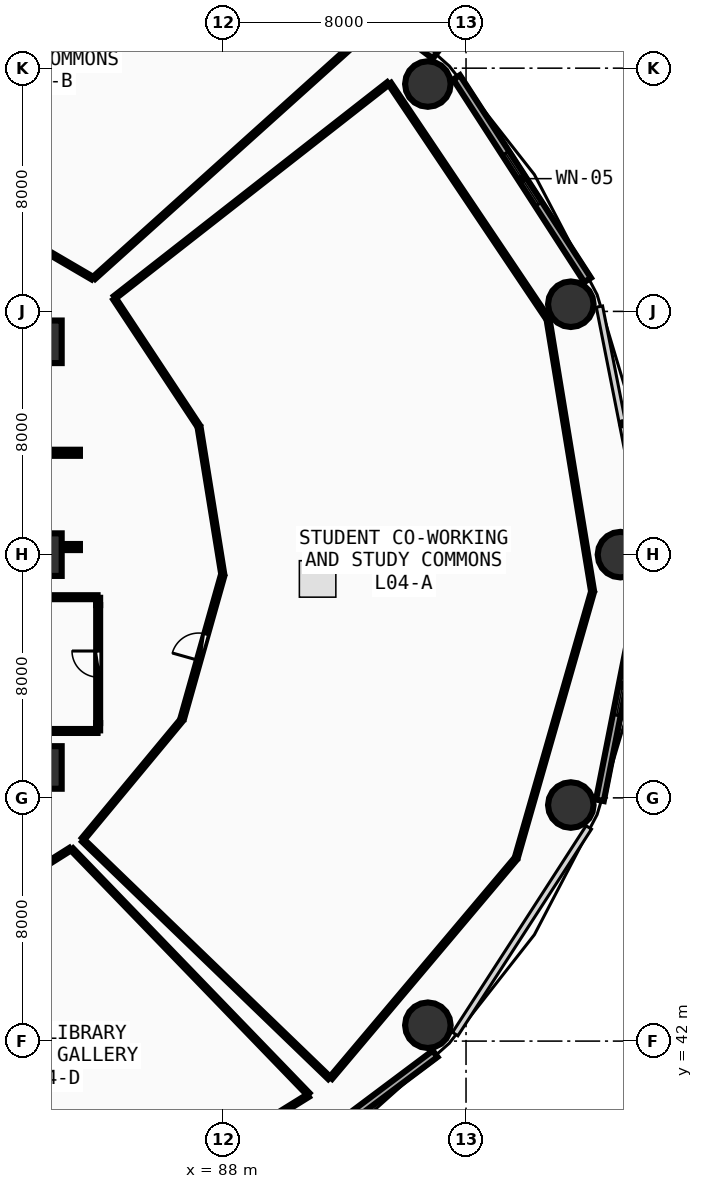
"""IFC4 building model, lengths in metres.
Left out: names, types, materials, properties, quantities, classifications, styles, units other than length and angle.
Written with IfcOpenShell. Run it as: python <this file> out.ifc"""

import sys

from ifc_helpers import new_model, si_unit, direction, frame, frame_2d, origin, origin_2d, place, context, subcontext, project, spatial, rectangle, circle, extrude, element, fill, save


model = new_model("IFC4")
c1 = context("Model", 3, precision=1e-05, world=origin(), true_north=direction((0.0, 1.0)))
c2 = subcontext(c1, "Body", "Model", "MODEL_VIEW")
j1 = project(units=[si_unit("LENGTHUNIT", "METRE"), si_unit("PLANEANGLEUNIT", "RADIAN")], contexts=[c1])
p1 = place(None, origin())
s1 = spatial("IfcSite", under=j1, at=p1, CompositionType="ELEMENT")
p2 = place(p1, origin())
s2 = spatial("IfcBuilding", under=s1, at=p2, CompositionType="ELEMENT")
p3 = place(p2, frame((0.0, 0.0, 18.0)))
s3 = spatial("IfcBuildingStorey", under=s2, at=p3, CompositionType="ELEMENT", Elevation=18.0)
for number, where, z_axis, x_axis in (
    (1, (82.0, 51.0, 0.0), (0.0, 0.0, 1.0), (1.0, 0.0, 0.0)),
    (2, (82.0, 58.0, 0.0), (0.0, 0.0, 1.0), (1.0, 0.0, 0.0)),
    (3, (82.0, 65.0, 0.0), (0.0, 0.0, 1.0), (1.0, 0.0, 0.0)),
):
    element("IfcColumn", number, at=place(p3, frame(where, z_axis=z_axis, x_axis=x_axis)), inside=s3, PredefinedType="PILASTER", context=c2, shape_type="SweptSolid", body=[
        extrude(rectangle(XDim=1.4, YDim=1.4, at=origin_2d()), origin(), (0.0, 0.0, 1.0), 4.5),
    ])
for number, where, z_axis, x_axis in (
    (4, (101.08, 58.0, 0.0), (0.0, 0.0, 1.0), (1.0, 0.0, 0.0)),
    (5, (99.447, 66.236, 0.0), (0.0, 0.0, 1.0), (1.0, 0.0, 0.0)),
    (6, (94.744, 73.478, 0.0), (0.0, 0.0, 1.0), (1.0, 0.0, 0.0)),
    (7, (94.744, 42.522, 0.0), (0.0, 0.0, 1.0), (1.0, 0.0, 0.0)),
    (8, (99.447, 49.764, 0.0), (0.0, 0.0, 1.0), (1.0, 0.0, 0.0)),
):
    element("IfcColumn", number, at=place(p3, frame(where, z_axis=z_axis, x_axis=x_axis)), inside=s3, PredefinedType="COLUMN", context=c2, shape_type="SweptSolid", body=[
        extrude(circle(Radius=0.75, at=origin_2d()), origin(), (0.0, 0.0, 1.0), 4.5),
    ])
p4 = place(p3, frame((99.999, 67.033, 0.0), z_axis=(0.0, 0.0, 1.0), x_axis=(-0.543005114258, 0.839729388488, 0.0)))
e9 = element("IfcWall", 9, at=p4, inside=s3, PredefinedType="SOLIDWALL", context=c2, shape_type="SweptSolid", body=[
    extrude(rectangle(XDim=7.938, YDim=0.26, at=frame_2d((3.969, 0.0))), origin(), (0.0, 0.0, 1.0), 4.225),
])
p5 = place(p4, frame((2.969, 0.0, 0.85)))
e10 = element("IfcOpeningElement", 10, at=p5, cuts=e9, PredefinedType="OPENING", context=c2, shape_type="SweptSolid", body=[
    extrude(rectangle(XDim=2.0, YDim=1.75, at=frame_2d((1.0, 0.875))), frame((0.0, 0.14, 0.0), z_axis=(0.0, -1.0, 0.0), x_axis=(1.0, 0.0, 0.0)), (0.0, 0.0, 1.0), 0.28),
])
p6 = place(p3, frame((94.984, 74.418, 0.0), z_axis=(0.0, 0.0, 1.0), x_axis=(-0.80030733173, 0.599590005569, 0.0)))
e11 = element("IfcWall", 11, at=p6, inside=s3, PredefinedType="SOLIDWALL", context=c2, shape_type="SweptSolid", body=[
    extrude(rectangle(XDim=8.291, YDim=0.26, at=frame_2d((4.145, 0.0))), origin(), (0.0, 0.0, 1.0), 4.225),
])
p7 = place(p6, frame((3.145, 0.0, 0.85)))
e12 = element("IfcOpeningElement", 12, at=p7, cuts=e11, PredefinedType="OPENING", context=c2, shape_type="SweptSolid", body=[
    extrude(rectangle(XDim=2.0, YDim=1.75, at=frame_2d((1.0, 0.875))), frame((0.0, 0.14, 0.0), z_axis=(0.0, -1.0, 0.0), x_axis=(1.0, 0.0, 0.0)), (0.0, 0.0, 1.0), 0.28),
])
p8 = place(p3, frame((88.349, 36.611, 0.0), z_axis=(0.0, 0.0, 1.0), x_axis=(0.80030733173, 0.599590005569, 0.0)))
e13 = element("IfcWall", 13, at=p8, inside=s3, PredefinedType="SOLIDWALL", context=c2, shape_type="SweptSolid", body=[
    extrude(rectangle(XDim=8.291, YDim=0.26, at=frame_2d((4.145, 0.0))), origin(), (0.0, 0.0, 1.0), 4.225),
])
p9 = place(p8, frame((3.145, 0.0, 0.85)))
e14 = element("IfcOpeningElement", 14, at=p9, cuts=e13, PredefinedType="OPENING", context=c2, shape_type="SweptSolid", body=[
    extrude(rectangle(XDim=2.0, YDim=1.75, at=frame_2d((1.0, 0.875))), frame((0.0, 0.14, 0.0), z_axis=(0.0, -1.0, 0.0), x_axis=(1.0, 0.0, 0.0)), (0.0, 0.0, 1.0), 0.28),
])
p10 = place(p3, frame((100.404, 49.92, 0.0), z_axis=(0.0, 0.0, 1.0), x_axis=(0.193726159581, 0.98105564322, 0.0)))
e15 = element("IfcWall", 15, at=p10, inside=s3, PredefinedType="SOLIDWALL", context=c2, shape_type="SweptSolid", body=[
    extrude(rectangle(XDim=7.703, YDim=0.26, at=frame_2d((3.851, 0.0))), origin(), (0.0, 0.0, 1.0), 4.225),
])
p11 = place(p10, frame((2.851, 0.0, 0.85)))
e16 = element("IfcOpeningElement", 16, at=p11, cuts=e15, PredefinedType="OPENING", context=c2, shape_type="SweptSolid", body=[
    extrude(rectangle(XDim=2.0, YDim=1.75, at=frame_2d((1.0, 0.875))), frame((0.0, 0.14, 0.0), z_axis=(0.0, -1.0, 0.0), x_axis=(1.0, 0.0, 0.0)), (0.0, 0.0, 1.0), 0.28),
])
p12 = place(p3, frame((79.3, 61.35, 0.0), z_axis=(0.0, 0.0, 1.0), x_axis=(1.0, 0.0, 0.0)))
e17 = element("IfcWall", 17, at=p12, inside=s3, PredefinedType="SOLIDWALL", context=c2, shape_type="SweptSolid", body=[
    extrude(rectangle(XDim=4.0, YDim=0.2, at=frame_2d((2.0, 0.0))), origin(), (0.0, 0.0, 1.0), 3.525),
])
p13 = place(p12, frame((0.45, 0.0, 0.0)))
e18 = element("IfcOpeningElement", 18, at=p13, cuts=e17, PredefinedType="OPENING", context=c2, shape_type="SweptSolid", body=[
    extrude(rectangle(XDim=1.2, YDim=2.15, at=frame_2d((0.6, 1.075))), frame((0.0, 0.11, 0.0), z_axis=(0.0, -1.0, 0.0), x_axis=(1.0, 0.0, 0.0)), (0.0, 0.0, 1.0), 0.22),
])
p14 = place(p3, frame((79.3, 58.25, 0.0), z_axis=(0.0, 0.0, 1.0), x_axis=(1.0, 0.0, 0.0)))
e19 = element("IfcWall", 19, at=p14, inside=s3, PredefinedType="SOLIDWALL", context=c2, shape_type="SweptSolid", body=[
    extrude(rectangle(XDim=4.0, YDim=0.2, at=frame_2d((2.0, 0.0))), origin(), (0.0, 0.0, 1.0), 3.525),
])
p15 = place(p14, frame((0.5, 0.0, 0.0)))
e20 = element("IfcOpeningElement", 20, at=p15, cuts=e19, PredefinedType="OPENING", context=c2, shape_type="SweptSolid", body=[
    extrude(rectangle(XDim=1.1, YDim=2.1, at=frame_2d((0.55, 1.05))), frame((0.0, 0.11, 0.0), z_axis=(0.0, -1.0, 0.0), x_axis=(1.0, 0.0, 0.0)), (0.0, 0.0, 1.0), 0.22),
])
p16 = place(p3, frame((83.9, 52.46, 0.0), z_axis=(0.0, 0.0, 1.0), x_axis=(0.0, 1.0, 0.0)))
e21 = element("IfcWall", 21, at=p16, inside=s3, PredefinedType="PLUMBINGWALL", context=c2, shape_type="SweptSolid", body=[
    extrude(rectangle(XDim=3.88, YDim=0.13, at=frame_2d((1.94, 0.0))), origin(), (0.0, 0.0, 1.0), 4.23),
])
p17 = place(p16, frame((1.51, 0.0, 0.0)))
e22 = element("IfcOpeningElement", 22, at=p17, cuts=e21, PredefinedType="OPENING", context=c2, shape_type="SweptSolid", body=[
    extrude(rectangle(XDim=0.86, YDim=2.05, at=frame_2d((0.43, 1.025))), frame((0.0, 0.075, 0.0), z_axis=(0.0, -1.0, 0.0), x_axis=(1.0, 0.0, 0.0)), (0.0, 0.0, 1.0), 0.15),
])
p18 = place(p3, frame((86.67, 52.625, 0.0), z_axis=(0.0, 0.0, 1.0), x_axis=(0.27156800538, 0.962419252953, 0.0)))
e23 = element("IfcWall", 23, at=p18, inside=s3, PredefinedType="PARTITIONING", context=c2, shape_type="SweptSolid", body=[
    extrude(rectangle(XDim=4.839, YDim=0.12, at=frame_2d((2.42, 0.0))), origin(), (0.0, 0.0, 1.0), 4.23),
])
p19 = place(p18, frame((1.97, 0.0, 0.0)))
e24 = element("IfcOpeningElement", 24, at=p19, cuts=e23, PredefinedType="OPENING", context=c2, shape_type="SweptSolid", body=[
    extrude(rectangle(XDim=0.9, YDim=2.08, at=frame_2d((0.45, 1.04))), frame((0.0, 0.07, 0.0), z_axis=(0.0, -1.0, 0.0), x_axis=(1.0, 0.0, 0.0)), (0.0, 0.0, 1.0), 0.14),
])
p20 = place(p3, frame((82.14, 52.2, 0.0), z_axis=(0.0, 0.0, 1.0), x_axis=(1.0, 0.0, 0.0)))
e25 = element("IfcWall", 25, at=p20, inside=s3, PredefinedType="PLUMBINGWALL", context=c2, shape_type="SweptSolid", body=[
    extrude(rectangle(XDim=1.74, YDim=0.13, at=frame_2d((0.87, 0.0))), origin(), (0.0, 0.0, 1.0), 3.525),
])
for number, where, z_axis, x_axis in (
    (26, (83.9, 52.22, 0.0), (0.0, 0.0, 1.0), (0.0, 1.0, 0.0)),
    (27, (83.9, 56.34, 0.0), (0.0, 0.0, 1.0), (0.0, 1.0, 0.0)),
):
    element("IfcWall", number, at=place(p3, frame(where, z_axis=z_axis, x_axis=x_axis)), inside=s3, PredefinedType="PLUMBINGWALL", context=c2, shape_type="SweptSolid", body=[
        extrude(rectangle(XDim=0.24, YDim=0.13, at=frame_2d((0.12, 0.0))), origin(), (0.0, 0.0, 1.0), 4.23),
    ])
p21 = place(p3, frame((83.88, 56.6, 0.0), z_axis=(0.0, 0.0, 1.0), x_axis=(-1.0, 0.0, 0.0)))
e28 = element("IfcWall", 28, at=p21, inside=s3, PredefinedType="PLUMBINGWALL", context=c2, shape_type="SweptSolid", body=[
    extrude(rectangle(XDim=1.74, YDim=0.13, at=frame_2d((0.87, 0.0))), origin(), (0.0, 0.0, 1.0), 3.525),
])
p22 = place(p3, frame((83.406, 48.653, 0.0), z_axis=(0.0, 0.0, 1.0), x_axis=(0.638526743423, 0.769599634832, 0.0)))
e29 = element("IfcWall", 29, at=p22, inside=s3, PredefinedType="PARTITIONING", context=c2, shape_type="SweptSolid", body=[
    extrude(rectangle(XDim=5.046, YDim=0.1, at=frame_2d((2.523, 0.0))), origin(), (0.0, 0.0, 1.0), 3.625),
])
p23 = place(p3, frame((87.995, 57.379, 0.0), z_axis=(0.0, 0.0, 1.0), x_axis=(-0.159023783725, 0.987274752138, 0.0)))
e30 = element("IfcWall", 30, at=p23, inside=s3, PredefinedType="PARTITIONING", context=c2, shape_type="SweptSolid", body=[
    extrude(rectangle(XDim=4.856, YDim=0.1, at=frame_2d((2.428, 0.0))), origin(), (0.0, 0.0, 1.0), 3.625),
])
p24 = place(p3, frame((87.194, 62.246, 0.0), z_axis=(0.0, 0.0, 1.0), x_axis=(-0.551434167509, 0.834218411991, 0.0)))
e31 = element("IfcWall", 31, at=p24, inside=s3, PredefinedType="PARTITIONING", context=c2, shape_type="SweptSolid", body=[
    extrude(rectangle(XDim=4.992, YDim=0.1, at=frame_2d((2.496, 0.0))), origin(), (0.0, 0.0, 1.0), 3.625),
])
p25 = place(p3, frame((84.45, 66.469, 0.0), z_axis=(0.0, 0.0, 1.0), x_axis=(0.787637262368, 0.616139223657, 0.0)))
e32 = element("IfcWall", 32, at=p25, inside=s3, PredefinedType="PARTITIONING", context=c2, shape_type="SweptSolid", body=[
    extrude(rectangle(XDim=11.411, YDim=0.1, at=frame_2d((5.706, 0.0))), origin(), (0.0, 0.0, 1.0), 3.625),
])
p26 = place(p3, frame((93.492, 73.491, 0.0), z_axis=(0.0, 0.0, 1.0), x_axis=(0.557691554606, -0.830048269633, 0.0)))
e33 = element("IfcWall", 33, at=p26, inside=s3, PredefinedType="PARTITIONING", context=c2, shape_type="SweptSolid", body=[
    extrude(rectangle(XDim=9.293, YDim=0.1, at=frame_2d((4.646, 0.0))), origin(), (0.0, 0.0, 1.0), 3.625),
])
p27 = place(p3, frame((98.704, 65.705, 0.0), z_axis=(0.0, 0.0, 1.0), x_axis=(0.161586587371, -0.986858538384, 0.0)))
e34 = element("IfcWall", 34, at=p27, inside=s3, PredefinedType="PARTITIONING", context=c2, shape_type="SweptSolid", body=[
    extrude(rectangle(XDim=8.997, YDim=0.1, at=frame_2d((4.499, 0.0))), origin(), (0.0, 0.0, 1.0), 3.625),
])
p28 = place(p3, frame((100.153, 56.748, 0.0), z_axis=(0.0, 0.0, 1.0), x_axis=(-0.275668999864, -0.96125262159, 0.0)))
e35 = element("IfcWall", 35, at=p28, inside=s3, PredefinedType="PARTITIONING", context=c2, shape_type="SweptSolid", body=[
    extrude(rectangle(XDim=9.048, YDim=0.1, at=frame_2d((4.524, 0.0))), origin(), (0.0, 0.0, 1.0), 3.625),
])
p29 = place(p3, frame((97.622, 47.981, 0.0), z_axis=(0.0, 0.0, 1.0), x_axis=(-0.64470133806, -0.764434552269, 0.0)))
e36 = element("IfcWall", 36, at=p29, inside=s3, PredefinedType="PARTITIONING", context=c2, shape_type="SweptSolid", body=[
    extrude(rectangle(XDim=9.408, YDim=0.1, at=frame_2d((4.704, 0.0))), origin(), (0.0, 0.0, 1.0), 3.625),
])
p30 = place(p3, frame((91.502, 40.787, 0.0), z_axis=(0.0, 0.0, 1.0), x_axis=(-0.719662166332, 0.694324395618, 0.0)))
e37 = element("IfcWall", 37, at=p30, inside=s3, PredefinedType="PARTITIONING", context=c2, shape_type="SweptSolid", body=[
    extrude(rectangle(XDim=11.245, YDim=0.1, at=frame_2d((5.622, 0.0))), origin(), (0.0, 0.0, 1.0), 3.925),
])
p31 = place(p3, frame((83.705, 67.098, 0.0), z_axis=(0.0, 0.0, 1.0), x_axis=(-0.863300951282, 0.504689476327, 0.0)))
e38 = element("IfcWall", 38, at=p31, inside=s3, PredefinedType="PARTITIONING", context=c2, shape_type="SweptSolid", body=[
    extrude(rectangle(XDim=5.117, YDim=0.1, at=frame_2d((2.559, 0.0))), origin(), (0.0, 0.0, 1.0), 3.625),
])
p32 = place(p3, frame((92.17, 74.662, 0.0), z_axis=(0.0, 0.0, 1.0), x_axis=(-0.743473519906, -0.668765373803, 0.0)))
e39 = element("IfcWall", 39, at=p32, inside=s3, PredefinedType="PARTITIONING", context=c2, shape_type="SweptSolid", body=[
    extrude(rectangle(XDim=11.301, YDim=0.1, at=frame_2d((5.65, 0.0))), origin(), (0.0, 0.0, 1.0), 3.925),
])
p33 = place(p3, frame((81.044, 47.092, 0.0), z_axis=(0.0, 0.0, 1.0), x_axis=(0.845952823598, 0.533257742791, 0.0)))
e40 = element("IfcWall", 40, at=p33, inside=s3, PredefinedType="PARTITIONING", context=c2, shape_type="SweptSolid", body=[
    extrude(rectangle(XDim=2.287, YDim=0.1, at=frame_2d((1.144, 0.0))), origin(), (0.0, 0.0, 1.0), 3.625),
])
p34 = place(p3, frame((83.04, 48.304, 0.0), z_axis=(0.0, 0.0, 1.0), x_axis=(0.694759604878, -0.719242025628, 0.0)))
e41 = element("IfcWall", 41, at=p34, inside=s3, PredefinedType="PARTITIONING", context=c2, shape_type="SweptSolid", body=[
    extrude(rectangle(XDim=11.189, YDim=0.1, at=frame_2d((5.594, 0.0))), origin(), (0.0, 0.0, 1.0), 3.625),
])
p35 = place(p3, frame((90.807, 40.207, 0.0), z_axis=(0.0, 0.0, 1.0), x_axis=(-0.849859173494, -0.527009853066, 0.0)))
e42 = element("IfcWall", 42, at=p35, inside=s3, PredefinedType="PARTITIONING", context=c2, shape_type="SweptSolid", body=[
    extrude(rectangle(XDim=4.322, YDim=0.1, at=frame_2d((2.161, 0.0))), origin(), (0.0, 0.0, 1.0), 3.625),
])
p36 = place(p5, origin())
e43 = element("IfcWindow", 43, at=p36, inside=s3, PartitioningType="SINGLE_PANEL", PredefinedType="WINDOW", context=c2, shape_type="SweptSolid", body=[
    extrude(rectangle(XDim=2.0, YDim=1.75, at=frame_2d((1.0, 0.875))), frame((0.0, 0.03, 0.0), z_axis=(0.0, -1.0, 0.0), x_axis=(1.0, 0.0, 0.0)), (0.0, 0.0, 1.0), 0.06),
])
fill(e10, e43)
p37 = place(p11, origin())
e44 = element("IfcWindow", 44, at=p37, inside=s3, PartitioningType="SINGLE_PANEL", PredefinedType="WINDOW", context=c2, shape_type="SweptSolid", body=[
    extrude(rectangle(XDim=2.0, YDim=1.75, at=frame_2d((1.0, 0.875))), frame((0.0, 0.03, 0.0), z_axis=(0.0, -1.0, 0.0), x_axis=(1.0, 0.0, 0.0)), (0.0, 0.0, 1.0), 0.06),
])
fill(e16, e44)
p38 = place(p17, origin())
e45 = element("IfcDoor", 45, at=p38, inside=s3, OperationType="SINGLE_SWING_RIGHT", PredefinedType="DOOR", context=c2, shape_type="SweptSolid", body=[
    extrude(rectangle(XDim=0.86, YDim=2.05, at=frame_2d((0.43, 1.025))), frame((0.0, 0.025, 0.0), z_axis=(0.0, -1.0, 0.0), x_axis=(1.0, 0.0, 0.0)), (0.0, 0.0, 1.0), 0.05),
])
fill(e22, e45)
p39 = place(p19, origin())
e46 = element("IfcDoor", 46, at=p39, inside=s3, OperationType="SINGLE_SWING_LEFT", PredefinedType="DOOR", context=c2, shape_type="SweptSolid", body=[
    extrude(rectangle(XDim=0.9, YDim=2.08, at=frame_2d((0.45, 1.04))), frame((0.0, 0.025, 0.0), z_axis=(0.0, -1.0, 0.0), x_axis=(1.0, 0.0, 0.0)), (0.0, 0.0, 1.0), 0.05),
])
fill(e24, e46)
save(model, sys.argv[1])
